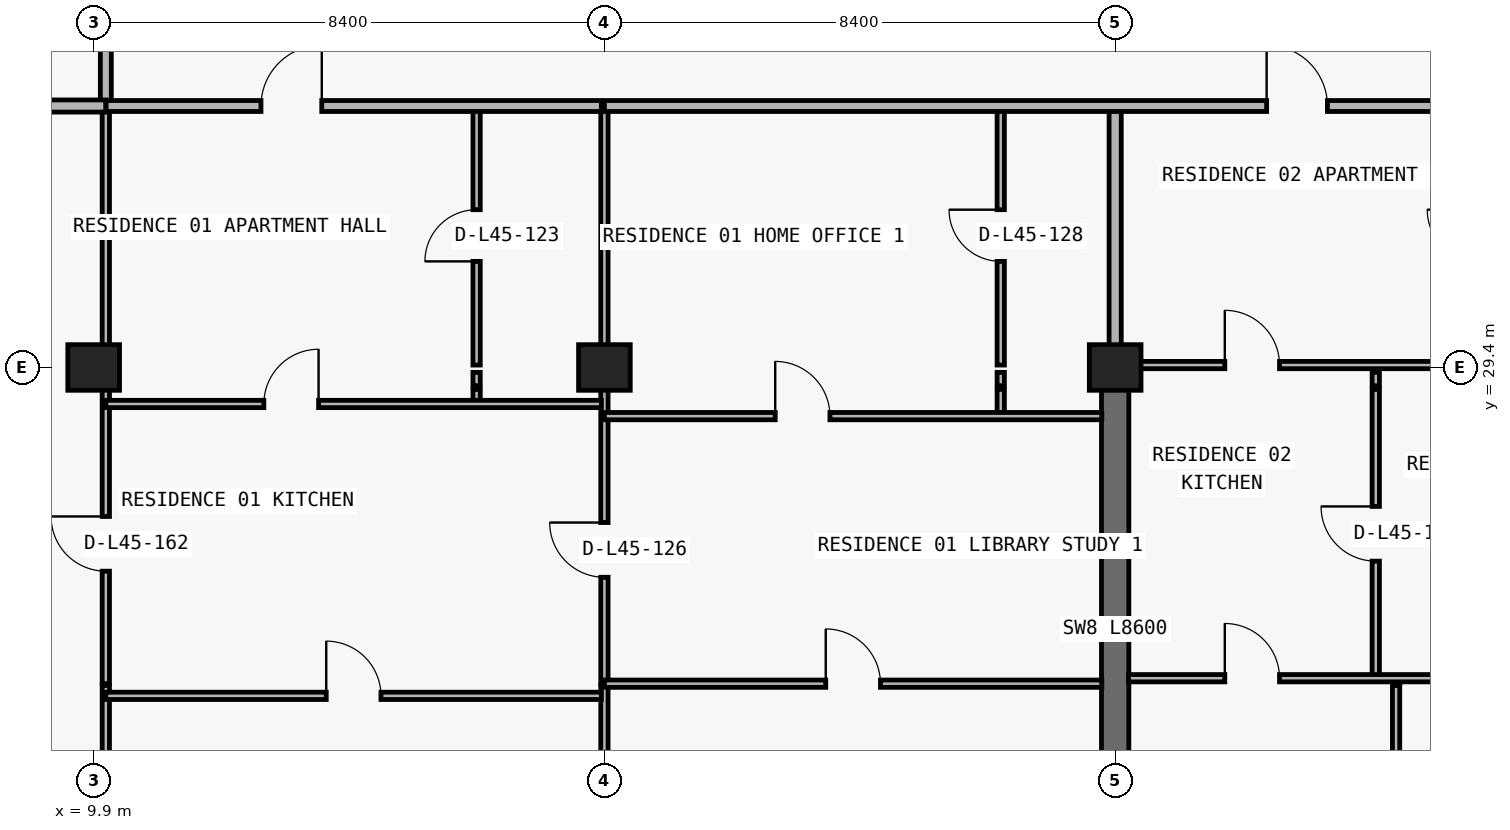
"""IFC4 building model, lengths in metres.
Left out: names, types, materials, properties, quantities, classifications, styles, units other than length and angle.
Written with IfcOpenShell. Run it as: python <this file> out.ifc"""

import sys

from ifc_helpers import new_model, si_unit, direction, frame, frame_2d, origin, origin_2d, place, context, subcontext, project, spatial, rectangle, extrude, element, fill, save


model = new_model("IFC4")
c1 = context("Model", 3, precision=1e-05, world=origin(), true_north=direction((0.0, 1.0)))
c2 = subcontext(c1, "Body", "Model", "MODEL_VIEW")
j1 = project(units=[si_unit("LENGTHUNIT", "METRE"), si_unit("PLANEANGLEUNIT", "RADIAN")], contexts=[c1])
p1 = place(None, origin())
s1 = spatial("IfcSite", under=j1, at=p1, CompositionType="ELEMENT")
p2 = place(p1, origin())
s2 = spatial("IfcBuilding", under=s1, at=p2, CompositionType="ELEMENT")
p3 = place(p2, frame((0.0, 0.0, 163.8)))
s3 = spatial("IfcBuildingStorey", under=s2, at=p3, CompositionType="ELEMENT", Elevation=163.8)
for number, where, z_axis, x_axis in (
    (1, (9.9, 29.4, 0.0), (0.0, 0.0, 1.0), (1.0, 0.0, 0.0)),
    (2, (18.3, 29.4, 0.0), (0.0, 0.0, 1.0), (1.0, 0.0, 0.0)),
    (3, (26.7, 29.4, 0.0), (0.0, 0.0, 1.0), (1.0, 0.0, 0.0)),
):
    element("IfcColumn", number, at=place(p3, frame(where, z_axis=z_axis, x_axis=x_axis)), inside=s3, PredefinedType="COLUMN", context=c2, shape_type="SweptSolid", body=[
        extrude(rectangle(XDim=0.85, YDim=0.75, at=origin_2d()), origin(), (0.0, 0.0, 1.0), 3.05),
    ])
p4 = place(p3, frame((26.7, 20.8, 0.0), z_axis=(0.0, 0.0, 1.0), x_axis=(0.0, 1.0, 0.0)))
e4 = element("IfcWall", 4, at=p4, inside=s3, PredefinedType="SHEAR", context=c2, shape_type="SweptSolid", body=[
    extrude(rectangle(XDim=8.6, YDim=0.45, at=frame_2d((4.3, 0.0))), origin(), (0.0, 0.0, 1.0), 3.05),
])
p5 = place(p3, frame((10.1, 11.285, 0.0), z_axis=(0.0, 0.0, 1.0), x_axis=(0.0, 1.0, 0.0)))
e5 = element("IfcWall", 5, at=p5, inside=s3, PredefinedType="PARTITIONING", context=c2, shape_type="SweptSolid", body=[
    extrude(rectangle(XDim=12.885, YDim=0.12, at=frame_2d((6.442, 0.0))), origin(), (0.0, 0.0, 1.0), 2.263),
])
p6 = place(p3, frame((10.1, 24.2, 0.0), z_axis=(0.0, 0.0, 1.0), x_axis=(0.0, 1.0, 0.0)))
e6 = element("IfcWall", 6, at=p6, inside=s3, PredefinedType="PARTITIONING", context=c2, shape_type="SweptSolid", body=[
    extrude(rectangle(XDim=4.84, YDim=0.12, at=frame_2d((2.42, 0.0))), origin(), (0.0, 0.0, 1.0), 2.263),
])
p7 = place(p6, frame((1.85, 0.0, 0.0)))
e7 = element("IfcOpeningElement", 7, at=p7, cuts=e6, PredefinedType="OPENING", context=c2, shape_type="SweptSolid", body=[
    extrude(rectangle(XDim=0.9, YDim=2.15, at=frame_2d((0.45, 1.075))), frame((0.0, 0.07, 0.0), z_axis=(0.0, -1.0, 0.0), x_axis=(1.0, 0.0, 0.0)), (0.0, 0.0, 1.0), 0.14),
])
p8 = place(p3, frame((10.1, 29.1, 0.0), z_axis=(0.0, 0.0, 1.0), x_axis=(0.0, 1.0, 0.0)))
e8 = element("IfcWall", 8, at=p8, inside=s3, PredefinedType="PARTITIONING", context=c2, shape_type="SweptSolid", body=[
    extrude(rectangle(XDim=0.22, YDim=0.12, at=frame_2d((0.11, 0.0))), origin(), (0.0, 0.0, 1.0), 3.05),
])
p9 = place(p3, frame((10.1, 29.44, 0.0), z_axis=(0.0, 0.0, 1.0), x_axis=(0.0, 1.0, 0.0)))
e9 = element("IfcWall", 9, at=p9, inside=s3, PredefinedType="PARTITIONING", context=c2, shape_type="SweptSolid", body=[
    extrude(rectangle(XDim=4.26, YDim=0.12, at=frame_2d((2.13, 0.0))), origin(), (0.0, 0.0, 1.0), 2.263),
])
p10 = place(p3, frame((10.1, 33.705, 0.0), z_axis=(0.0, 0.0, 1.0), x_axis=(0.0, 1.0, 0.0)))
e10 = element("IfcWall", 10, at=p10, inside=s3, PredefinedType="PARTITIONING", context=c2, shape_type="SweptSolid", body=[
    extrude(rectangle(XDim=3.245, YDim=0.18, at=frame_2d((1.623, 0.0))), origin(), (0.0, 0.0, 1.0), 2.263),
])
p11 = place(p3, frame((16.198, 28.8, 0.0), z_axis=(0.0, 0.0, 1.0), x_axis=(0.0, 1.0, 0.0)))
e11 = element("IfcWall", 11, at=p11, inside=s3, PredefinedType="PARTITIONING", context=c2, shape_type="SweptSolid", body=[
    extrude(rectangle(XDim=0.24, YDim=0.12, at=frame_2d((0.12, 0.0))), origin(), (0.0, 0.0, 1.0), 2.725),
])
p12 = place(p3, frame((16.198, 29.1, 0.0), z_axis=(0.0, 0.0, 1.0), x_axis=(0.0, 1.0, 0.0)))
e12 = element("IfcWall", 12, at=p12, inside=s3, PredefinedType="PARTITIONING", context=c2, shape_type="SweptSolid", body=[
    extrude(rectangle(XDim=0.22, YDim=0.12, at=frame_2d((0.11, 0.0))), origin(), (0.0, 0.0, 1.0), 2.725),
])
p13 = place(p3, frame((16.198, 29.44, 0.0), z_axis=(0.0, 0.0, 1.0), x_axis=(0.0, 1.0, 0.0)))
e13 = element("IfcWall", 13, at=p13, inside=s3, PredefinedType="PARTITIONING", context=c2, shape_type="SweptSolid", body=[
    extrude(rectangle(XDim=4.26, YDim=0.12, at=frame_2d((2.13, 0.0))), origin(), (0.0, 0.0, 1.0), 2.725),
])
p14 = place(p13, frame((1.705, 0.0, 0.0)))
e14 = element("IfcOpeningElement", 14, at=p14, cuts=e13, PredefinedType="OPENING", context=c2, shape_type="SweptSolid", body=[
    extrude(rectangle(XDim=0.85, YDim=2.1, at=frame_2d((0.425, 1.05))), frame((0.0, 0.07, 0.0), z_axis=(0.0, -1.0, 0.0), x_axis=(1.0, 0.0, 0.0)), (0.0, 0.0, 1.0), 0.14),
])
p15 = place(p3, frame((18.3, 11.24, 0.0), z_axis=(0.0, 0.0, 1.0), x_axis=(0.0, 1.0, 0.0)))
e15 = element("IfcWall", 15, at=p15, inside=s3, PredefinedType="PARTITIONING", context=c2, shape_type="SweptSolid", body=[
    extrude(rectangle(XDim=12.93, YDim=0.12, at=frame_2d((6.465, 0.0))), origin(), (0.0, 0.0, 1.0), 2.263),
])
p16 = place(p3, frame((18.3, 24.2, 0.0), z_axis=(0.0, 0.0, 1.0), x_axis=(0.0, 1.0, 0.0)))
e16 = element("IfcWall", 16, at=p16, inside=s3, PredefinedType="PARTITIONING", context=c2, shape_type="SweptSolid", body=[
    extrude(rectangle(XDim=4.84, YDim=0.12, at=frame_2d((2.42, 0.0))), origin(), (0.0, 0.0, 1.0), 2.263),
])
p17 = place(p16, frame((1.75, 0.0, 0.0)))
e17 = element("IfcOpeningElement", 17, at=p17, cuts=e16, PredefinedType="OPENING", context=c2, shape_type="SweptSolid", body=[
    extrude(rectangle(XDim=0.9, YDim=2.15, at=frame_2d((0.45, 1.075))), frame((0.0, 0.07, 0.0), z_axis=(0.0, -1.0, 0.0), x_axis=(1.0, 0.0, 0.0)), (0.0, 0.0, 1.0), 0.14),
])
p18 = place(p3, frame((18.3, 29.1, 0.0), z_axis=(0.0, 0.0, 1.0), x_axis=(0.0, 1.0, 0.0)))
e18 = element("IfcWall", 18, at=p18, inside=s3, PredefinedType="PARTITIONING", context=c2, shape_type="SweptSolid", body=[
    extrude(rectangle(XDim=0.22, YDim=0.12, at=frame_2d((0.11, 0.0))), origin(), (0.0, 0.0, 1.0), 3.05),
])
p19 = place(p3, frame((18.3, 29.44, 0.0), z_axis=(0.0, 0.0, 1.0), x_axis=(0.0, 1.0, 0.0)))
e19 = element("IfcWall", 19, at=p19, inside=s3, PredefinedType="PARTITIONING", context=c2, shape_type="SweptSolid", body=[
    extrude(rectangle(XDim=4.26, YDim=0.12, at=frame_2d((2.13, 0.0))), origin(), (0.0, 0.0, 1.0), 2.263),
])
p20 = place(p3, frame((24.818, 28.6, 0.0), z_axis=(0.0, 0.0, 1.0), x_axis=(0.0, 1.0, 0.0)))
e20 = element("IfcWall", 20, at=p20, inside=s3, PredefinedType="PARTITIONING", context=c2, shape_type="SweptSolid", body=[
    extrude(rectangle(XDim=0.44, YDim=0.12, at=frame_2d((0.22, 0.0))), origin(), (0.0, 0.0, 1.0), 2.725),
])
p21 = place(p3, frame((24.818, 29.1, 0.0), z_axis=(0.0, 0.0, 1.0), x_axis=(0.0, 1.0, 0.0)))
e21 = element("IfcWall", 21, at=p21, inside=s3, PredefinedType="PARTITIONING", context=c2, shape_type="SweptSolid", body=[
    extrude(rectangle(XDim=0.22, YDim=0.12, at=frame_2d((0.11, 0.0))), origin(), (0.0, 0.0, 1.0), 2.725),
])
p22 = place(p3, frame((24.818, 29.44, 0.0), z_axis=(0.0, 0.0, 1.0), x_axis=(0.0, 1.0, 0.0)))
e22 = element("IfcWall", 22, at=p22, inside=s3, PredefinedType="PARTITIONING", context=c2, shape_type="SweptSolid", body=[
    extrude(rectangle(XDim=4.26, YDim=0.12, at=frame_2d((2.13, 0.0))), origin(), (0.0, 0.0, 1.0), 3.05),
])
p23 = place(p22, frame((1.705, 0.0, 0.0)))
e23 = element("IfcOpeningElement", 23, at=p23, cuts=e22, PredefinedType="OPENING", context=c2, shape_type="SweptSolid", body=[
    extrude(rectangle(XDim=0.85, YDim=2.1, at=frame_2d((0.425, 1.05))), frame((0.0, 0.07, 0.0), z_axis=(0.0, -1.0, 0.0), x_axis=(1.0, 0.0, 0.0)), (0.0, 0.0, 1.0), 0.14),
])
p24 = place(p3, frame((26.7, 29.44, 0.0), z_axis=(0.0, 0.0, 1.0), x_axis=(0.0, 1.0, 0.0)))
e24 = element("IfcWall", 24, at=p24, inside=s3, PredefinedType="PARTITIONING", context=c2, shape_type="SweptSolid", body=[
    extrude(rectangle(XDim=4.26, YDim=0.2, at=frame_2d((2.13, 0.0))), origin(), (0.0, 0.0, 1.0), 2.335),
])
p25 = place(p3, frame((30.986, 24.29, 0.0), z_axis=(0.0, 0.0, 1.0), x_axis=(0.0, 1.0, 0.0)))
e25 = element("IfcWall", 25, at=p25, inside=s3, PredefinedType="PARTITIONING", context=c2, shape_type="SweptSolid", body=[
    extrude(rectangle(XDim=4.75, YDim=0.12, at=frame_2d((2.375, 0.0))), origin(), (0.0, 0.0, 1.0), 2.499),
])
p26 = place(p25, frame((1.925, 0.0, 0.0)))
e26 = element("IfcOpeningElement", 26, at=p26, cuts=e25, PredefinedType="OPENING", context=c2, shape_type="SweptSolid", body=[
    extrude(rectangle(XDim=0.9, YDim=2.15, at=frame_2d((0.45, 1.075))), frame((0.0, 0.07, 0.0), z_axis=(0.0, -1.0, 0.0), x_axis=(1.0, 0.0, 0.0)), (0.0, 0.0, 1.0), 0.14),
])
p27 = place(p3, frame((30.986, 29.1, 0.0), z_axis=(0.0, 0.0, 1.0), x_axis=(0.0, 1.0, 0.0)))
e27 = element("IfcWall", 27, at=p27, inside=s3, PredefinedType="PARTITIONING", context=c2, shape_type="SweptSolid", body=[
    extrude(rectangle(XDim=0.22, YDim=0.12, at=frame_2d((0.11, 0.0))), origin(), (0.0, 0.0, 1.0), 2.499),
])
p28 = place(p3, frame((31.32, 11.24, 0.0), z_axis=(0.0, 0.0, 1.0), x_axis=(0.0, 1.0, 0.0)))
e28 = element("IfcWall", 28, at=p28, inside=s3, PredefinedType="PARTITIONING", context=c2, shape_type="SweptSolid", body=[
    extrude(rectangle(XDim=12.93, YDim=0.12, at=frame_2d((6.465, 0.0))), origin(), (0.0, 0.0, 1.0), 3.05),
])
p29 = place(p3, frame((31.32, 24.2, 0.0), z_axis=(0.0, 0.0, 1.0), x_axis=(0.0, 1.0, 0.0)))
e29 = element("IfcWall", 29, at=p29, inside=s3, PredefinedType="PARTITIONING", context=c2, shape_type="SweptSolid", body=[
    extrude(rectangle(XDim=0.09, YDim=0.12, at=frame_2d((0.045, 0.0))), origin(), (0.0, 0.0, 1.0), 3.05),
])
p30 = place(p3, frame((10.1, 24.0, 0.0), z_axis=(0.0, 0.0, 1.0), x_axis=(1.0, 0.0, 0.0)))
e30 = element("IfcWall", 30, at=p30, inside=s3, PredefinedType="PARTITIONING", context=c2, shape_type="SweptSolid", body=[
    extrude(rectangle(XDim=8.15, YDim=0.12, at=frame_2d((4.075, 0.0))), origin(), (0.0, 0.0, 1.0), 3.05),
])
p31 = place(p30, frame((3.625, 0.0, 0.0)))
e31 = element("IfcOpeningElement", 31, at=p31, cuts=e30, PredefinedType="OPENING", context=c2, shape_type="SweptSolid", body=[
    extrude(rectangle(XDim=0.9, YDim=2.15, at=frame_2d((0.45, 1.075))), frame((0.0, 0.07, 0.0), z_axis=(0.0, -1.0, 0.0), x_axis=(1.0, 0.0, 0.0)), (0.0, 0.0, 1.0), 0.14),
])
p32 = place(p3, frame((18.3, 24.2, 0.0), z_axis=(0.0, 0.0, 1.0), x_axis=(1.0, 0.0, 0.0)))
e32 = element("IfcWall", 32, at=p32, inside=s3, PredefinedType="PARTITIONING", context=c2, shape_type="SweptSolid", body=[
    extrude(rectangle(XDim=8.18, YDim=0.12, at=frame_2d((4.09, 0.0))), origin(), (0.0, 0.0, 1.0), 3.05),
])
p33 = place(p32, frame((3.64, 0.0, 0.0)))
e33 = element("IfcOpeningElement", 33, at=p33, cuts=e32, PredefinedType="OPENING", context=c2, shape_type="SweptSolid", body=[
    extrude(rectangle(XDim=0.9, YDim=2.15, at=frame_2d((0.45, 1.075))), frame((0.0, 0.07, 0.0), z_axis=(0.0, -1.0, 0.0), x_axis=(1.0, 0.0, 0.0)), (0.0, 0.0, 1.0), 0.14),
])
p34 = place(p3, frame((26.92, 24.29, 0.0), z_axis=(0.0, 0.0, 1.0), x_axis=(1.0, 0.0, 0.0)))
e34 = element("IfcWall", 34, at=p34, inside=s3, PredefinedType="PARTITIONING", context=c2, shape_type="SweptSolid", body=[
    extrude(rectangle(XDim=8.18, YDim=0.12, at=frame_2d((4.09, 0.0))), origin(), (0.0, 0.0, 1.0), 3.05),
])
p35 = place(p34, frame((1.583, 0.0, 0.0)))
e35 = element("IfcOpeningElement", 35, at=p35, cuts=e34, PredefinedType="OPENING", context=c2, shape_type="SweptSolid", body=[
    extrude(rectangle(XDim=0.9, YDim=2.15, at=frame_2d((0.45, 1.075))), frame((0.0, 0.07, 0.0), z_axis=(0.0, -1.0, 0.0), x_axis=(1.0, 0.0, 0.0)), (0.0, 0.0, 1.0), 0.14),
])
p36 = place(p34, frame((5.84, 0.0, 0.0)))
e36 = element("IfcOpeningElement", 36, at=p36, cuts=e34, PredefinedType="OPENING", context=c2, shape_type="SweptSolid", body=[
    extrude(rectangle(XDim=0.9, YDim=2.15, at=frame_2d((0.45, 1.075))), frame((0.0, 0.07, 0.0), z_axis=(0.0, -1.0, 0.0), x_axis=(1.0, 0.0, 0.0)), (0.0, 0.0, 1.0), 0.14),
])
p37 = place(p3, frame((18.3, 28.6, 0.0), z_axis=(0.0, 0.0, 1.0), x_axis=(1.0, 0.0, 0.0)))
e37 = element("IfcWall", 37, at=p37, inside=s3, PredefinedType="PARTITIONING", context=c2, shape_type="SweptSolid", body=[
    extrude(rectangle(XDim=8.18, YDim=0.12, at=frame_2d((4.09, 0.0))), origin(), (0.0, 0.0, 1.0), 3.05),
])
p38 = place(p37, frame((2.809, 0.0, 0.0)))
e38 = element("IfcOpeningElement", 38, at=p38, cuts=e37, PredefinedType="OPENING", context=c2, shape_type="SweptSolid", body=[
    extrude(rectangle(XDim=0.9, YDim=2.15, at=frame_2d((0.45, 1.075))), frame((0.0, 0.07, 0.0), z_axis=(0.0, -1.0, 0.0), x_axis=(1.0, 0.0, 0.0)), (0.0, 0.0, 1.0), 0.14),
])
p39 = place(p3, frame((10.1, 28.8, 0.0), z_axis=(0.0, 0.0, 1.0), x_axis=(1.0, 0.0, 0.0)))
e39 = element("IfcWall", 39, at=p39, inside=s3, PredefinedType="PARTITIONING", context=c2, shape_type="SweptSolid", body=[
    extrude(rectangle(XDim=8.15, YDim=0.12, at=frame_2d((4.075, 0.0))), origin(), (0.0, 0.0, 1.0), 3.05),
])
p40 = place(p39, frame((2.599, 0.0, 0.0)))
e40 = element("IfcOpeningElement", 40, at=p40, cuts=e39, PredefinedType="OPENING", context=c2, shape_type="SweptSolid", body=[
    extrude(rectangle(XDim=0.9, YDim=2.15, at=frame_2d((0.45, 1.075))), frame((0.0, 0.07, 0.0), z_axis=(0.0, -1.0, 0.0), x_axis=(1.0, 0.0, 0.0)), (0.0, 0.0, 1.0), 0.14),
])
p41 = place(p3, frame((26.92, 29.44, 0.0), z_axis=(0.0, 0.0, 1.0), x_axis=(1.0, 0.0, 0.0)))
e41 = element("IfcWall", 41, at=p41, inside=s3, PredefinedType="PARTITIONING", context=c2, shape_type="SweptSolid", body=[
    extrude(rectangle(XDim=8.18, YDim=0.12, at=frame_2d((4.09, 0.0))), origin(), (0.0, 0.0, 1.0), 2.263),
])
p42 = place(p41, frame((1.583, 0.0, 0.0)))
e42 = element("IfcOpeningElement", 42, at=p42, cuts=e41, PredefinedType="OPENING", context=c2, shape_type="SweptSolid", body=[
    extrude(rectangle(XDim=0.9, YDim=2.15, at=frame_2d((0.45, 1.075))), frame((0.0, 0.07, 0.0), z_axis=(0.0, -1.0, 0.0), x_axis=(1.0, 0.0, 0.0)), (0.0, 0.0, 1.0), 0.14),
])
p43 = place(p3, frame((6.395, 33.7, 0.0), z_axis=(0.0, 0.0, 1.0), x_axis=(1.0, 0.0, 0.0)))
e43 = element("IfcWall", 43, at=p43, inside=s3, PredefinedType="PARTITIONING", context=c2, shape_type="SweptSolid", body=[
    extrude(rectangle(XDim=3.705, YDim=0.2, at=frame_2d((1.853, 0.0))), origin(), (0.0, 0.0, 1.0), 3.05),
])
p44 = place(p3, frame((10.105, 33.7, 0.0), z_axis=(0.0, 0.0, 1.0), x_axis=(1.0, 0.0, 0.0)))
e44 = element("IfcWall", 44, at=p44, inside=s3, PredefinedType="PARTITIONING", context=c2, shape_type="SweptSolid", body=[
    extrude(rectangle(XDim=8.145, YDim=0.18, at=frame_2d((4.073, 0.0))), origin(), (0.0, 0.0, 1.0), 3.05),
])
p45 = place(p44, frame((2.546, 0.0, 0.0)))
e45 = element("IfcOpeningElement", 45, at=p45, cuts=e44, PredefinedType="OPENING", context=c2, shape_type="SweptSolid", body=[
    extrude(rectangle(XDim=1.0, YDim=2.2, at=frame_2d((0.5, 1.1))), frame((0.0, 0.1, 0.0), z_axis=(0.0, -1.0, 0.0), x_axis=(1.0, 0.0, 0.0)), (0.0, 0.0, 1.0), 0.2),
])
p46 = place(p3, frame((18.3, 33.7, 0.0), z_axis=(0.0, 0.0, 1.0), x_axis=(1.0, 0.0, 0.0)))
e46 = element("IfcWall", 46, at=p46, inside=s3, PredefinedType="PARTITIONING", context=c2, shape_type="SweptSolid", body=[
    extrude(rectangle(XDim=20.372, YDim=0.18, at=frame_2d((10.186, 0.0))), origin(), (0.0, 0.0, 1.0), 3.05),
])
p47 = place(p46, frame((10.891, 0.0, 0.0)))
e47 = element("IfcOpeningElement", 47, at=p47, cuts=e46, PredefinedType="OPENING", context=c2, shape_type="SweptSolid", body=[
    extrude(rectangle(XDim=1.0, YDim=2.2, at=frame_2d((0.5, 1.1))), frame((0.0, 0.1, 0.0), z_axis=(0.0, -1.0, 0.0), x_axis=(1.0, 0.0, 0.0)), (0.0, 0.0, 1.0), 0.2),
])
p48 = place(p46, frame((18.086, 0.0, 0.0)))
e48 = element("IfcOpeningElement", 48, at=p48, cuts=e46, PredefinedType="OPENING", context=c2, shape_type="SweptSolid", body=[
    extrude(rectangle(XDim=1.0, YDim=2.2, at=frame_2d((0.5, 1.1))), frame((0.0, 0.1, 0.0), z_axis=(0.0, -1.0, 0.0), x_axis=(1.0, 0.0, 0.0)), (0.0, 0.0, 1.0), 0.2),
])
p49 = place(p45, origin())
e49 = element("IfcDoor", 49, at=p49, inside=s3, OperationType="SINGLE_SWING_RIGHT", PredefinedType="DOOR", context=c2, shape_type="SweptSolid", body=[
    extrude(rectangle(XDim=1.0, YDim=2.2, at=frame_2d((0.5, 1.1))), frame((0.0, 0.025, 0.0), z_axis=(0.0, -1.0, 0.0), x_axis=(1.0, 0.0, 0.0)), (0.0, 0.0, 1.0), 0.05),
])
fill(e45, e49)
p50 = place(p14, origin())
e50 = element("IfcDoor", 50, at=p50, inside=s3, OperationType="SINGLE_SWING_LEFT", PredefinedType="DOOR", context=c2, shape_type="SweptSolid", body=[
    extrude(rectangle(XDim=0.85, YDim=2.1, at=frame_2d((0.425, 1.05))), frame((0.0, 0.025, 0.0), z_axis=(0.0, -1.0, 0.0), x_axis=(1.0, 0.0, 0.0)), (0.0, 0.0, 1.0), 0.05),
])
fill(e14, e50)
p51 = place(p40, origin())
e51 = element("IfcDoor", 51, at=p51, inside=s3, OperationType="SINGLE_SWING_RIGHT", PredefinedType="DOOR", context=c2, shape_type="SweptSolid", body=[
    extrude(rectangle(XDim=0.9, YDim=2.15, at=frame_2d((0.45, 1.075))), frame((0.0, 0.025, 0.0), z_axis=(0.0, -1.0, 0.0), x_axis=(1.0, 0.0, 0.0)), (0.0, 0.0, 1.0), 0.05),
])
fill(e40, e51)
p52 = place(p31, origin())
e52 = element("IfcDoor", 52, at=p52, inside=s3, OperationType="SINGLE_SWING_LEFT", PredefinedType="DOOR", context=c2, shape_type="SweptSolid", body=[
    extrude(rectangle(XDim=0.9, YDim=2.15, at=frame_2d((0.45, 1.075))), frame((0.0, 0.025, 0.0), z_axis=(0.0, -1.0, 0.0), x_axis=(1.0, 0.0, 0.0)), (0.0, 0.0, 1.0), 0.05),
])
fill(e31, e52)
p53 = place(p17, origin())
e53 = element("IfcDoor", 53, at=p53, inside=s3, OperationType="SINGLE_SWING_RIGHT", PredefinedType="DOOR", context=c2, shape_type="SweptSolid", body=[
    extrude(rectangle(XDim=0.9, YDim=2.15, at=frame_2d((0.45, 1.075))), frame((0.0, 0.025, 0.0), z_axis=(0.0, -1.0, 0.0), x_axis=(1.0, 0.0, 0.0)), (0.0, 0.0, 1.0), 0.05),
])
fill(e17, e53)
p54 = place(p38, origin())
e54 = element("IfcDoor", 54, at=p54, inside=s3, OperationType="SINGLE_SWING_LEFT", PredefinedType="DOOR", context=c2, shape_type="SweptSolid", body=[
    extrude(rectangle(XDim=0.9, YDim=2.15, at=frame_2d((0.45, 1.075))), frame((0.0, 0.025, 0.0), z_axis=(0.0, -1.0, 0.0), x_axis=(1.0, 0.0, 0.0)), (0.0, 0.0, 1.0), 0.05),
])
fill(e38, e54)
p55 = place(p23, origin())
e55 = element("IfcDoor", 55, at=p55, inside=s3, OperationType="SINGLE_SWING_RIGHT", PredefinedType="DOOR", context=c2, shape_type="SweptSolid", body=[
    extrude(rectangle(XDim=0.85, YDim=2.1, at=frame_2d((0.425, 1.05))), frame((0.0, 0.025, 0.0), z_axis=(0.0, -1.0, 0.0), x_axis=(1.0, 0.0, 0.0)), (0.0, 0.0, 1.0), 0.05),
])
fill(e23, e55)
p56 = place(p33, origin())
e56 = element("IfcDoor", 56, at=p56, inside=s3, OperationType="SINGLE_SWING_LEFT", PredefinedType="DOOR", context=c2, shape_type="SweptSolid", body=[
    extrude(rectangle(XDim=0.9, YDim=2.15, at=frame_2d((0.45, 1.075))), frame((0.0, 0.025, 0.0), z_axis=(0.0, -1.0, 0.0), x_axis=(1.0, 0.0, 0.0)), (0.0, 0.0, 1.0), 0.05),
])
fill(e33, e56)
p57 = place(p47, origin())
e57 = element("IfcDoor", 57, at=p57, inside=s3, OperationType="SINGLE_SWING_LEFT", PredefinedType="DOOR", context=c2, shape_type="SweptSolid", body=[
    extrude(rectangle(XDim=1.0, YDim=2.2, at=frame_2d((0.5, 1.1))), frame((0.0, 0.025, 0.0), z_axis=(0.0, -1.0, 0.0), x_axis=(1.0, 0.0, 0.0)), (0.0, 0.0, 1.0), 0.05),
])
fill(e47, e57)
p58 = place(p42, origin())
e58 = element("IfcDoor", 58, at=p58, inside=s3, OperationType="SINGLE_SWING_LEFT", PredefinedType="DOOR", context=c2, shape_type="SweptSolid", body=[
    extrude(rectangle(XDim=0.9, YDim=2.15, at=frame_2d((0.45, 1.075))), frame((0.0, 0.025, 0.0), z_axis=(0.0, -1.0, 0.0), x_axis=(1.0, 0.0, 0.0)), (0.0, 0.0, 1.0), 0.05),
])
fill(e42, e58)
p59 = place(p26, origin())
e59 = element("IfcDoor", 59, at=p59, inside=s3, OperationType="SINGLE_SWING_RIGHT", PredefinedType="DOOR", context=c2, shape_type="SweptSolid", body=[
    extrude(rectangle(XDim=0.9, YDim=2.15, at=frame_2d((0.45, 1.075))), frame((0.0, 0.025, 0.0), z_axis=(0.0, -1.0, 0.0), x_axis=(1.0, 0.0, 0.0)), (0.0, 0.0, 1.0), 0.05),
])
fill(e26, e59)
p60 = place(p35, origin())
e60 = element("IfcDoor", 60, at=p60, inside=s3, OperationType="SINGLE_SWING_LEFT", PredefinedType="DOOR", context=c2, shape_type="SweptSolid", body=[
    extrude(rectangle(XDim=0.9, YDim=2.15, at=frame_2d((0.45, 1.075))), frame((0.0, 0.025, 0.0), z_axis=(0.0, -1.0, 0.0), x_axis=(1.0, 0.0, 0.0)), (0.0, 0.0, 1.0), 0.05),
])
fill(e35, e60)
p61 = place(p7, origin())
e61 = element("IfcDoor", 61, at=p61, inside=s3, OperationType="SINGLE_SWING_RIGHT", PredefinedType="DOOR", context=c2, shape_type="SweptSolid", body=[
    extrude(rectangle(XDim=0.9, YDim=2.15, at=frame_2d((0.45, 1.075))), frame((0.0, 0.025, 0.0), z_axis=(0.0, -1.0, 0.0), x_axis=(1.0, 0.0, 0.0)), (0.0, 0.0, 1.0), 0.05),
])
fill(e7, e61)
save(model, sys.argv[1])
